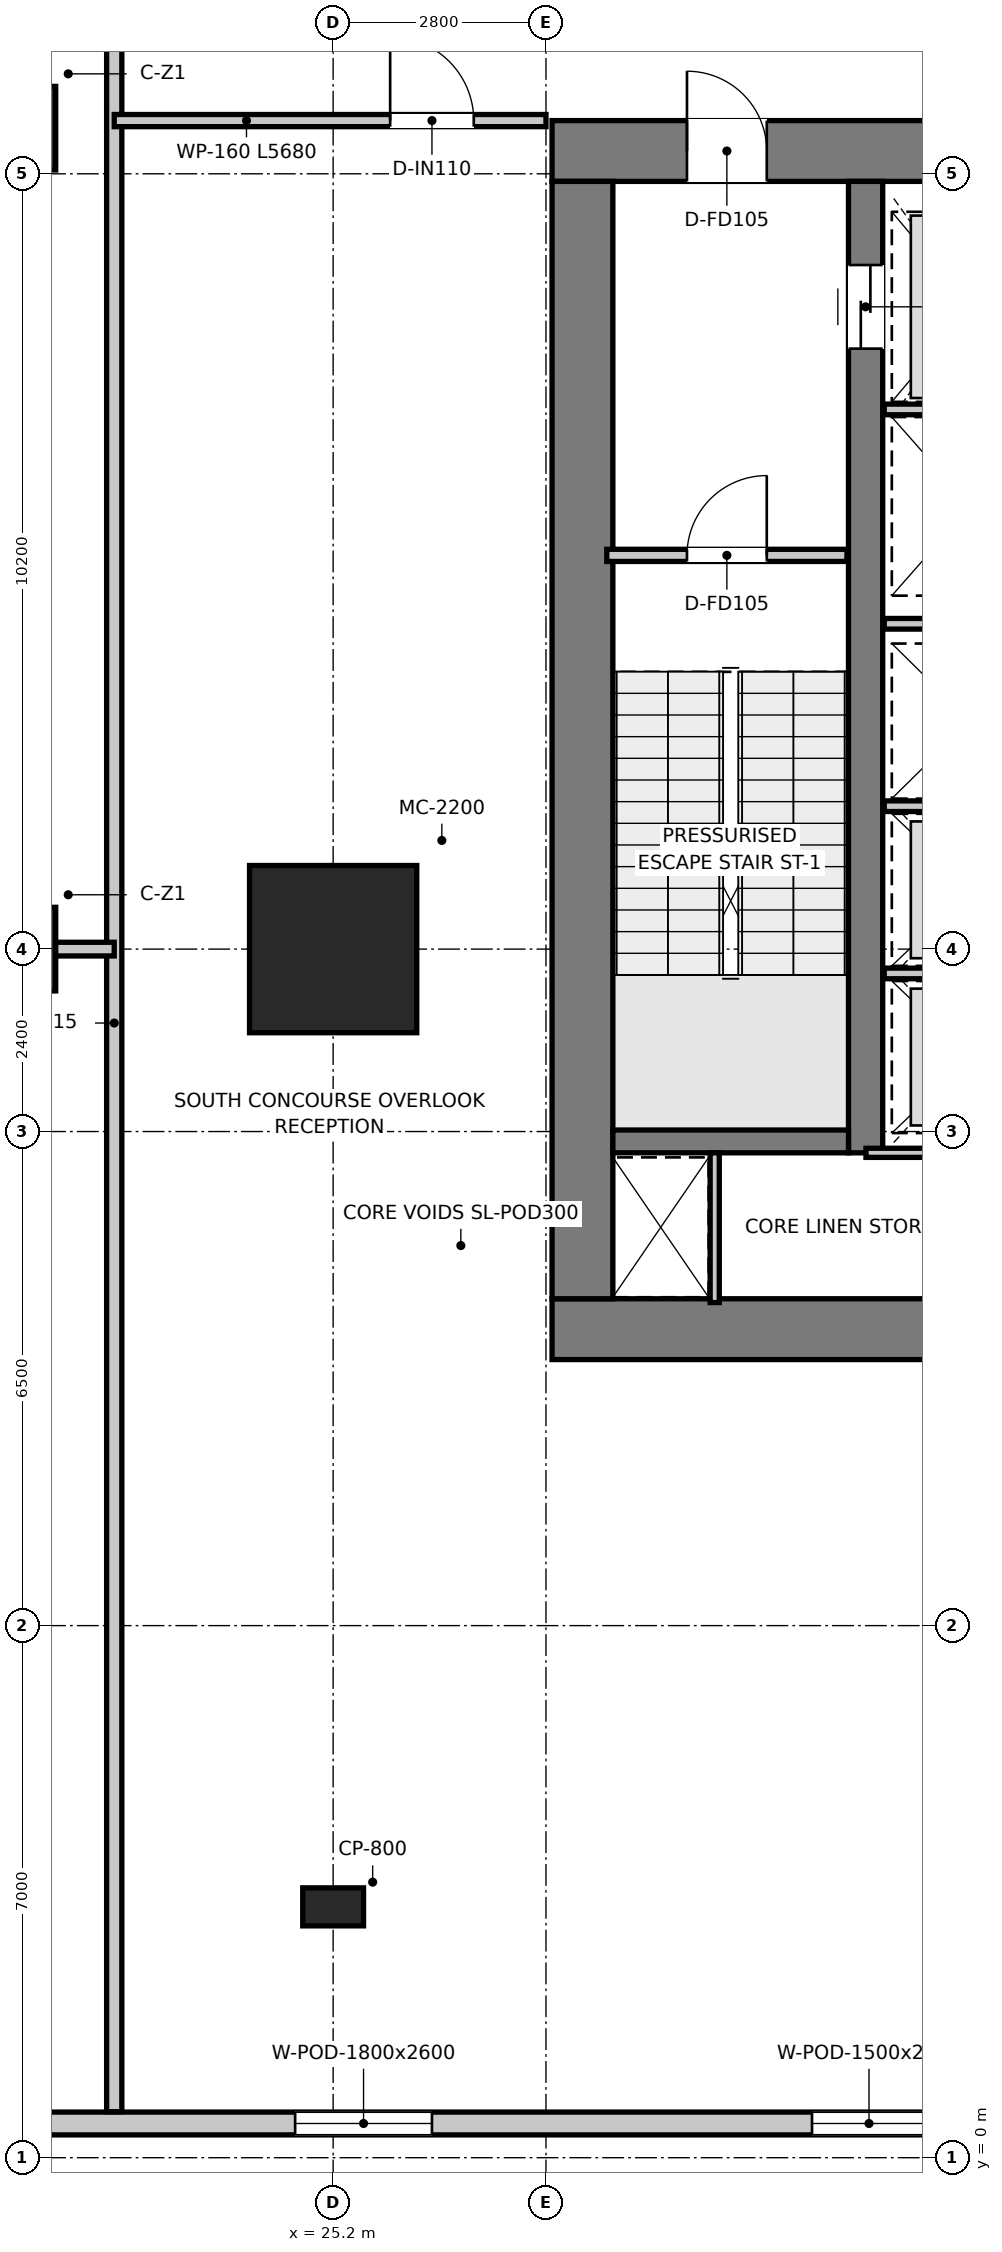
"""IFC4 building model, lengths in metres.
Left out: names, types, materials, properties, quantities, classifications, styles, units other than length and angle.
Written with IfcOpenShell. Run it as: python <this file> out.ifc"""

import sys

from ifc_helpers import new_model, si_unit, direction, frame, frame_2d, origin, origin_2d, place, context, subcontext, project, spatial, rectangle, extrude, source, transform, mapped, element, fill, save


model = new_model("IFC4")
c1 = context("Model", 3, precision=1e-05, world=origin(), true_north=direction((0.0, 1.0)))
c2 = subcontext(c1, "Body", "Model", "MODEL_VIEW")
j1 = project(units=[si_unit("LENGTHUNIT", "METRE"), si_unit("PLANEANGLEUNIT", "RADIAN")], contexts=[c1])
p1 = place(None, origin())
s1 = spatial("IfcSite", under=j1, at=p1, CompositionType="ELEMENT")
p2 = place(p1, origin())
s2 = spatial("IfcBuilding", under=s1, at=p2, CompositionType="ELEMENT")
p3 = place(p2, frame((0.0, 0.0, 5.4)))
s3 = spatial("IfcBuildingStorey", under=s2, at=p3, CompositionType="ELEMENT", Elevation=5.4)
p4 = place(p3, frame((28.08, 10.9, 0.0), z_axis=(0.0, 0.0, 1.0), x_axis=(1.0, 0.0, 0.0)))
e1 = element("IfcWall", 1, at=p4, inside=s3, PredefinedType="SHEAR", context=c2, shape_type="SweptSolid", body=[
    extrude(rectangle(XDim=15.84, YDim=0.8, at=frame_2d((7.92, 0.0))), origin(), (0.0, 0.0, 1.0), 5.0),
])
p5 = place(p3, frame((28.08, 26.4, 0.0), z_axis=(0.0, 0.0, 1.0), x_axis=(1.0, 0.0, 0.0)))
e2 = element("IfcWall", 2, at=p5, inside=s3, PredefinedType="SHEAR", context=c2, shape_type="SweptSolid", body=[
    extrude(rectangle(XDim=15.84, YDim=0.8, at=frame_2d((7.92, 0.0))), origin(), (0.0, 0.0, 1.0), 5.0),
])
p6 = place(p5, frame((7.22, 0.0, 0.0)))
e3 = element("IfcOpeningElement", 3, at=p6, cuts=e2, PredefinedType="OPENING", context=c2, shape_type="SweptSolid", body=[
    extrude(rectangle(XDim=1.4, YDim=2.2, at=frame_2d((0.7, 1.1))), frame((0.0, 0.41, 0.0), z_axis=(0.0, -1.0, 0.0), x_axis=(1.0, 0.0, 0.0)), (0.0, 0.0, 1.0), 0.82),
])
p7 = place(p5, frame((1.775, 0.0, 0.0)))
e4 = element("IfcOpeningElement", 4, at=p7, cuts=e2, PredefinedType="OPENING", context=c2, shape_type="SweptSolid", body=[
    extrude(rectangle(XDim=1.05, YDim=2.1, at=frame_2d((0.525, 1.05))), frame((0.0, 0.41, 0.0), z_axis=(0.0, -1.0, 0.0), x_axis=(1.0, 0.0, 0.0)), (0.0, 0.0, 1.0), 0.82),
])
p8 = place(p5, frame((13.015, 0.0, 0.0)))
e5 = element("IfcOpeningElement", 5, at=p8, cuts=e2, PredefinedType="OPENING", context=c2, shape_type="SweptSolid", body=[
    extrude(rectangle(XDim=1.05, YDim=2.1, at=frame_2d((0.525, 1.05))), frame((0.0, 0.41, 0.0), z_axis=(0.0, -1.0, 0.0), x_axis=(1.0, 0.0, 0.0)), (0.0, 0.0, 1.0), 0.82),
])
p9 = place(p3, frame((28.48, 11.3, 0.0), z_axis=(0.0, 0.0, 1.0), x_axis=(0.0, 1.0, 0.0)))
e6 = element("IfcWall", 6, at=p9, inside=s3, PredefinedType="SHEAR", context=c2, shape_type="SweptSolid", body=[
    extrude(rectangle(XDim=14.7, YDim=0.8, at=frame_2d((7.35, 0.0))), origin(), (0.0, 0.0, 1.0), 5.0),
])
p10 = place(p3, frame((32.205, 13.22, 0.0), z_axis=(0.0, 0.0, 1.0), x_axis=(0.0, 1.0, 0.0)))
e7 = element("IfcWall", 7, at=p10, inside=s3, PredefinedType="SHEAR", context=c2, shape_type="SweptSolid", body=[
    extrude(rectangle(XDim=12.78, YDim=0.45, at=frame_2d((6.39, 0.0))), origin(), (0.0, 0.0, 1.0), 5.0),
])
p11 = place(p10, frame((10.58, 0.0, 0.0)))
e8 = element("IfcOpeningElement", 8, at=p11, cuts=e7, PredefinedType="OPENING", context=c2, shape_type="SweptSolid", body=[
    extrude(rectangle(XDim=1.1, YDim=2.15, at=frame_2d((0.55, 1.075))), frame((0.0, 0.235, 0.0), z_axis=(0.0, -1.0, 0.0), x_axis=(1.0, 0.0, 0.0)), (0.0, 0.0, 1.0), 0.47),
])
p12 = place(p3, frame((28.88, 13.37, 0.0), z_axis=(0.0, 0.0, 1.0), x_axis=(1.0, 0.0, 0.0)))
e9 = element("IfcWall", 9, at=p12, inside=s3, PredefinedType="SHEAR", context=c2, shape_type="SweptSolid", body=[
    extrude(rectangle(XDim=3.1, YDim=0.3, at=frame_2d((1.55, 0.0))), origin(), (0.0, 0.0, 1.0), 5.0),
])
m1 = source(origin(), c2, "Body", "SweptSolid", [
    extrude(rectangle(XDim=2.2, YDim=2.2, at=origin_2d()), origin(), (0.0, 0.0, 1.0), 5.0),
])
p13 = place(p3, frame((25.2, 15.9, 0.0), z_axis=(0.0, 0.0, 1.0), x_axis=(1.0, 0.0, 0.0)))
e10 = element("IfcColumn", 10, at=p13, inside=s3, PredefinedType="USERDEFINED", context=c2, shape_type="MappedRepresentation", body=[
    mapped(m1, transform((0.0, 0.0, 0.0), x_axis=(1.0, 0.0, 0.0), y_axis=(0.0, 1.0, 0.0), z_axis=(0.0, 0.0, 1.0), scale=1.0)),
])
m2 = source(origin(), c2, "Body", "SweptSolid", [
    extrude(rectangle(XDim=1.1, YDim=1.1, at=origin_2d()), origin(), (0.0, 0.0, 1.0), 5.0),
])
for number, where, z_axis, x_axis in (
    (11, (21.0, 15.9, 0.0), (0.0, 0.0, 1.0), (1.0, 0.0, 0.0)),
    (12, (21.0, 26.7, 0.0), (0.0, 0.0, 1.0), (1.0, 0.0, 0.0)),
):
    element("IfcColumn", number, at=place(p3, frame(where, z_axis=z_axis, x_axis=x_axis)), inside=s3, PredefinedType="COLUMN", context=c2, shape_type="MappedRepresentation", body=[
        mapped(m2, transform((0.0, 0.0, 0.0), x_axis=(1.0, 0.0, 0.0), y_axis=(0.0, 1.0, 0.0), z_axis=(0.0, 0.0, 1.0), scale=1.0)),
    ])
m3 = source(origin(), c2, "Body", "SweptSolid", [
    extrude(rectangle(XDim=0.8, YDim=0.5, at=origin_2d()), origin(), (0.0, 0.0, 1.0), 5.0),
])
p14 = place(p3, frame((25.2, 3.3, 0.0), z_axis=(0.0, 0.0, 1.0), x_axis=(1.0, 0.0, 0.0)))
e13 = element("IfcColumn", 13, at=p14, inside=s3, PredefinedType="PILASTER", context=c2, shape_type="MappedRepresentation", body=[
    mapped(m3, transform((0.0, 0.0, 0.0), x_axis=(1.0, 0.0, 0.0), y_axis=(0.0, 1.0, 0.0), z_axis=(0.0, 0.0, 1.0), scale=1.0)),
])
p15 = place(p3, frame((72.0, 0.45, 0.0), z_axis=(0.0, 0.0, 1.0), x_axis=(-1.0, 0.0, 0.0)))
e14 = element("IfcWall", 14, at=p15, inside=s3, PredefinedType="SOLIDWALL", context=c2, shape_type="SweptSolid", body=[
    extrude(rectangle(XDim=72.0, YDim=0.3, at=frame_2d((36.0, 0.0))), origin(), (0.0, 0.0, 1.0), 4.7),
])
p16 = place(p15, frame((54.5, 0.0, 0.9)))
e15 = element("IfcOpeningElement", 15, at=p16, cuts=e14, PredefinedType="OPENING", context=c2, shape_type="SweptSolid", body=[
    extrude(rectangle(XDim=2.4, YDim=2.6, at=frame_2d((1.2, 1.3))), frame((0.0, 0.16, 0.0), z_axis=(0.0, -1.0, 0.0), x_axis=(1.0, 0.0, 0.0)), (0.0, 0.0, 1.0), 0.32),
])
p17 = place(p15, frame((45.5, 0.0, 0.9)))
e16 = element("IfcOpeningElement", 16, at=p17, cuts=e14, PredefinedType="OPENING", context=c2, shape_type="SweptSolid", body=[
    extrude(rectangle(XDim=1.8, YDim=2.6, at=frame_2d((0.9, 1.3))), frame((0.0, 0.16, 0.0), z_axis=(0.0, -1.0, 0.0), x_axis=(1.0, 0.0, 0.0)), (0.0, 0.0, 1.0), 0.32),
])
p18 = place(p15, frame((39.0, 0.0, 0.95)))
e17 = element("IfcOpeningElement", 17, at=p18, cuts=e14, PredefinedType="OPENING", context=c2, shape_type="SweptSolid", body=[
    extrude(rectangle(XDim=1.5, YDim=2.4, at=frame_2d((0.75, 1.2))), frame((0.0, 0.16, 0.0), z_axis=(0.0, -1.0, 0.0), x_axis=(1.0, 0.0, 0.0)), (0.0, 0.0, 1.0), 0.32),
])
p19 = place(p15, frame((31.0, 0.0, 0.95)))
e18 = element("IfcOpeningElement", 18, at=p19, cuts=e14, PredefinedType="OPENING", context=c2, shape_type="SweptSolid", body=[
    extrude(rectangle(XDim=1.2, YDim=2.4, at=frame_2d((0.6, 1.2))), frame((0.0, 0.16, 0.0), z_axis=(0.0, -1.0, 0.0), x_axis=(1.0, 0.0, 0.0)), (0.0, 0.0, 1.0), 0.32),
])
p20 = place(p15, frame((21.5, 0.0, 0.9)))
e19 = element("IfcOpeningElement", 19, at=p20, cuts=e14, PredefinedType="OPENING", context=c2, shape_type="SweptSolid", body=[
    extrude(rectangle(XDim=3.0, YDim=2.6, at=frame_2d((1.5, 1.3))), frame((0.0, 0.16, 0.0), z_axis=(0.0, -1.0, 0.0), x_axis=(1.0, 0.0, 0.0)), (0.0, 0.0, 1.0), 0.32),
])
p21 = place(p3, frame((28.8, 21.08, 0.0), z_axis=(0.0, 0.0, 1.0), x_axis=(1.0, 0.0, 0.0)))
e20 = element("IfcWall", 20, at=p21, inside=s3, PredefinedType="PARTITIONING", context=c2, shape_type="SweptSolid", body=[
    extrude(rectangle(XDim=3.16, YDim=0.16, at=frame_2d((1.58, 0.0))), origin(), (0.0, 0.0, 1.0), 4.7),
])
p22 = place(p21, frame((1.055, 0.0, 0.0)))
e21 = element("IfcOpeningElement", 21, at=p22, cuts=e20, PredefinedType="OPENING", context=c2, shape_type="SweptSolid", body=[
    extrude(rectangle(XDim=1.05, YDim=2.1, at=frame_2d((0.525, 1.05))), frame((0.0, 0.09, 0.0), z_axis=(0.0, -1.0, 0.0), x_axis=(1.0, 0.0, 0.0)), (0.0, 0.0, 1.0), 0.18),
])
p23 = place(p3, frame((32.45, 23.0, 0.0), z_axis=(0.0, 0.0, 1.0), x_axis=(1.0, 0.0, 0.0)))
e22 = element("IfcWall", 22, at=p23, inside=s3, PredefinedType="PARTITIONING", context=c2, shape_type="SweptSolid", body=[
    extrude(rectangle(XDim=2.27, YDim=0.14, at=frame_2d((1.135, 0.0))), origin(), (0.0, 0.0, 1.0), 3.5),
])
for number, where, z_axis, x_axis in (
    (23, (32.45, 17.78, 0.0), (0.0, 0.0, 1.0), (1.0, 0.0, 0.0)),
    (24, (32.45, 20.18, 0.0), (0.0, 0.0, 1.0), (1.0, 0.0, 0.0)),
    (25, (32.45, 15.58, 0.0), (0.0, 0.0, 1.0), (1.0, 0.0, 0.0)),
):
    element("IfcWall", number, at=place(p3, frame(where, z_axis=z_axis, x_axis=x_axis)), inside=s3, PredefinedType="PARTITIONING", context=c2, shape_type="SweptSolid", body=[
        extrude(rectangle(XDim=2.27, YDim=0.14, at=frame_2d((1.135, 0.0))), origin(), (0.0, 0.0, 1.0), 4.7),
    ])
p24 = place(p3, frame((30.22, 11.25, 0.0), z_axis=(0.0, 0.0, 1.0), x_axis=(0.0, 1.0, 0.0)))
e26 = element("IfcWall", 26, at=p24, inside=s3, PredefinedType="PARTITIONING", context=c2, shape_type="SweptSolid", body=[
    extrude(rectangle(XDim=1.97, YDim=0.12, at=frame_2d((0.985, 0.0))), origin(), (0.0, 0.0, 1.0), 4.7),
])
p25 = place(p3, frame((32.21, 13.22, 0.0), z_axis=(0.0, 0.0, 1.0), x_axis=(1.0, 0.0, 0.0)))
e27 = element("IfcWall", 27, at=p25, inside=s3, PredefinedType="PARTITIONING", context=c2, shape_type="SweptSolid", body=[
    extrude(rectangle(XDim=7.58, YDim=0.12, at=frame_2d((3.79, 0.0))), origin(), (0.0, 0.0, 1.0), 4.7),
])
p26 = place(p25, frame((3.365, 0.0, 0.0)))
e28 = element("IfcOpeningElement", 28, at=p26, cuts=e27, PredefinedType="OPENING", context=c2, shape_type="SweptSolid", body=[
    extrude(rectangle(XDim=0.85, YDim=2.1, at=frame_2d((0.425, 1.05))), frame((0.0, 0.07, 0.0), z_axis=(0.0, -1.0, 0.0), x_axis=(1.0, 0.0, 0.0)), (0.0, 0.0, 1.0), 0.14),
])
p27 = place(p3, frame((22.32, 0.605, 0.0), z_axis=(0.0, 0.0, 1.0), x_axis=(0.0, 1.0, 0.0)))
e29 = element("IfcWall", 29, at=p27, inside=s3, PredefinedType="PARTITIONING", context=c2, shape_type="SweptSolid", body=[
    extrude(rectangle(XDim=49.215, YDim=0.2, at=frame_2d((24.607, 0.0))), origin(), (0.0, 0.0, 1.0), 4.0),
])
p28 = place(p27, frame((28.795, 0.0, 0.0)))
e30 = element("IfcOpeningElement", 30, at=p28, cuts=e29, PredefinedType="OPENING", context=c2, shape_type="SweptSolid", body=[
    extrude(rectangle(XDim=1.6, YDim=2.2, at=frame_2d((0.8, 1.1))), frame((0.0, 0.11, 0.0), z_axis=(0.0, -1.0, 0.0), x_axis=(1.0, 0.0, 0.0)), (0.0, 0.0, 1.0), 0.22),
])
p29 = place(p27, frame((33.095, 0.0, 0.0)))
e31 = element("IfcOpeningElement", 31, at=p29, cuts=e29, PredefinedType="OPENING", context=c2, shape_type="SweptSolid", body=[
    extrude(rectangle(XDim=1.6, YDim=2.2, at=frame_2d((0.8, 1.1))), frame((0.0, 0.11, 0.0), z_axis=(0.0, -1.0, 0.0), x_axis=(1.0, 0.0, 0.0)), (0.0, 0.0, 1.0), 0.22),
])
p30 = place(p27, frame((42.845, 0.0, 0.0)))
e32 = element("IfcOpeningElement", 32, at=p30, cuts=e29, PredefinedType="OPENING", context=c2, shape_type="SweptSolid", body=[
    extrude(rectangle(XDim=1.1, YDim=2.15, at=frame_2d((0.55, 1.075))), frame((0.0, 0.11, 0.0), z_axis=(0.0, -1.0, 0.0), x_axis=(1.0, 0.0, 0.0)), (0.0, 0.0, 1.0), 0.22),
])
p31 = place(p3, frame((22.32, 26.8, 0.0), z_axis=(0.0, 0.0, 1.0), x_axis=(1.0, 0.0, 0.0)))
e33 = element("IfcWall", 33, at=p31, inside=s3, PredefinedType="PARTITIONING", context=c2, shape_type="SweptSolid", body=[
    extrude(rectangle(XDim=5.68, YDim=0.16, at=frame_2d((2.84, 0.0))), origin(), (0.0, 0.0, 1.0), 3.9),
])
p32 = place(p31, frame((3.63, 0.0, 0.0)))
e34 = element("IfcOpeningElement", 34, at=p32, cuts=e33, PredefinedType="OPENING", context=c2, shape_type="SweptSolid", body=[
    extrude(rectangle(XDim=1.1, YDim=2.15, at=frame_2d((0.55, 1.075))), frame((0.0, 0.09, 0.0), z_axis=(0.0, -1.0, 0.0), x_axis=(1.0, 0.0, 0.0)), (0.0, 0.0, 1.0), 0.18),
])
p33 = place(p3, frame((0.305, 15.9, 0.0), z_axis=(0.0, 0.0, 1.0), x_axis=(1.0, 0.0, 0.0)))
e35 = element("IfcWall", 35, at=p33, inside=s3, PredefinedType="PARTITIONING", context=c2, shape_type="SweptSolid", body=[
    extrude(rectangle(XDim=22.015, YDim=0.18, at=frame_2d((11.008, 0.0))), origin(), (0.0, 0.0, 1.0), 2.9),
])
p34 = place(p33, frame((16.72, 0.0, 0.0)))
e36 = element("IfcOpeningElement", 36, at=p34, cuts=e35, PredefinedType="OPENING", context=c2, shape_type="SweptSolid", body=[
    extrude(rectangle(XDim=0.95, YDim=2.1, at=frame_2d((0.475, 1.05))), frame((0.0, 0.1, 0.0), z_axis=(0.0, -1.0, 0.0), x_axis=(1.0, 0.0, 0.0)), (0.0, 0.0, 1.0), 0.2),
])
p35 = place(p17, origin())
e37 = element("IfcWindow", 37, at=p35, inside=s3, PartitioningType="SINGLE_PANEL", PredefinedType="WINDOW", context=c2, shape_type="SweptSolid", body=[
    extrude(rectangle(XDim=1.8, YDim=2.6, at=frame_2d((0.9, 1.3))), frame((0.0, 0.03, 0.0), z_axis=(0.0, -1.0, 0.0), x_axis=(1.0, 0.0, 0.0)), (0.0, 0.0, 1.0), 0.06),
])
fill(e16, e37)
p36 = place(p18, origin())
e38 = element("IfcWindow", 38, at=p36, inside=s3, PartitioningType="SINGLE_PANEL", PredefinedType="WINDOW", context=c2, shape_type="SweptSolid", body=[
    extrude(rectangle(XDim=1.5, YDim=2.4, at=frame_2d((0.75, 1.2))), frame((0.0, 0.03, 0.0), z_axis=(0.0, -1.0, 0.0), x_axis=(1.0, 0.0, 0.0)), (0.0, 0.0, 1.0), 0.06),
])
fill(e17, e38)
p37 = place(p22, origin())
e39 = element("IfcDoor", 39, at=p37, inside=s3, OperationType="SINGLE_SWING_RIGHT", PredefinedType="DOOR", context=c2, shape_type="SweptSolid", body=[
    extrude(rectangle(XDim=1.05, YDim=2.1, at=frame_2d((0.525, 1.05))), frame((0.0, 0.025, 0.0), z_axis=(0.0, -1.0, 0.0), x_axis=(1.0, 0.0, 0.0)), (0.0, 0.0, 1.0), 0.05),
])
fill(e21, e39)
p38 = place(p7, origin())
e40 = element("IfcDoor", 40, at=p38, inside=s3, OperationType="SINGLE_SWING_LEFT", PredefinedType="DOOR", context=c2, shape_type="SweptSolid", body=[
    extrude(rectangle(XDim=1.05, YDim=2.1, at=frame_2d((0.525, 1.05))), frame((0.0, 0.025, 0.0), z_axis=(0.0, -1.0, 0.0), x_axis=(1.0, 0.0, 0.0)), (0.0, 0.0, 1.0), 0.05),
])
fill(e4, e40)
p39 = place(p11, origin())
e41 = element("IfcDoor", 41, at=p39, inside=s3, OperationType="DOUBLE_DOOR_SLIDING", PredefinedType="DOOR", context=c2, shape_type="SweptSolid", body=[
    extrude(rectangle(XDim=1.1, YDim=2.15, at=frame_2d((0.55, 1.075))), frame((0.0, 0.025, 0.0), z_axis=(0.0, -1.0, 0.0), x_axis=(1.0, 0.0, 0.0)), (0.0, 0.0, 1.0), 0.05),
])
fill(e8, e41)
p40 = place(p32, origin())
e42 = element("IfcDoor", 42, at=p40, inside=s3, OperationType="SINGLE_SWING_LEFT", PredefinedType="DOOR", context=c2, shape_type="SweptSolid", body=[
    extrude(rectangle(XDim=1.1, YDim=2.15, at=frame_2d((0.55, 1.075))), frame((0.0, 0.025, 0.0), z_axis=(0.0, -1.0, 0.0), x_axis=(1.0, 0.0, 0.0)), (0.0, 0.0, 1.0), 0.05),
])
fill(e34, e42)
save(model, sys.argv[1])
